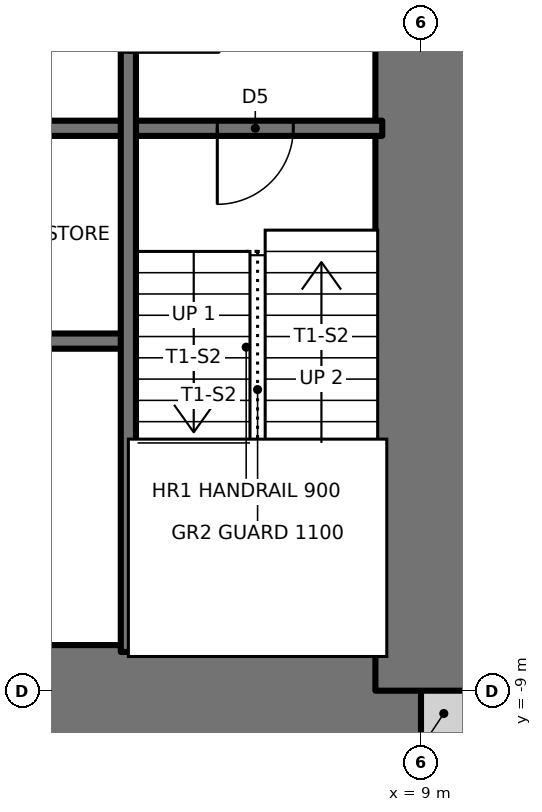
"""IFC4 building model, lengths in metres.
Left out: names, types, materials, properties, quantities, classifications, styles, units other than length and angle.
Written with IfcOpenShell. Run it as: python <this file> out.ifc"""

import sys

from ifc_helpers import new_model, si_unit, direction, frame, frame_2d, origin, place, context, subcontext, project, spatial, rectangle, extrude, element, fill, save


model = new_model("IFC4")
c1 = context("Model", 3, precision=1e-05, world=origin(), true_north=direction((0.0, 1.0)))
c2 = subcontext(c1, "Body", "Model", "MODEL_VIEW")
j1 = project(units=[si_unit("LENGTHUNIT", "METRE"), si_unit("PLANEANGLEUNIT", "RADIAN")], contexts=[c1])
p1 = place(None, origin())
s1 = spatial("IfcSite", under=j1, at=p1, CompositionType="ELEMENT")
p2 = place(p1, origin())
s2 = spatial("IfcBuilding", under=s1, at=p2, CompositionType="ELEMENT")
p3 = place(p2, frame((0.0, 0.0, 253.5)))
s3 = spatial("IfcBuildingStorey", under=s2, at=p3, CompositionType="ELEMENT", Elevation=253.5)
p4 = place(p3, frame((9.0, -9.3, 0.0), z_axis=(0.0, 0.0, 1.0), x_axis=(1.0, 0.0, 0.0)))
e1 = element("IfcWall", 1, at=p4, inside=s3, PredefinedType="SOLIDWALL", context=c2, shape_type="SweptSolid", body=[
    extrude(rectangle(XDim=0.6, YDim=0.6, at=frame_2d((0.3, 0.0))), origin(), (0.0, 0.0, 1.0), 3.5),
])
p5 = place(p3, frame((-9.0, -9.0, 0.0), z_axis=(0.0, 0.0, 1.0), x_axis=(1.0, 0.0, 0.0)))
e2 = element("IfcWall", 2, at=p5, inside=s3, PredefinedType="SHEAR", context=c2, shape_type="SweptSolid", body=[
    extrude(rectangle(XDim=18.0, YDim=1.2, at=frame_2d((9.0, 0.0))), origin(), (0.0, 0.0, 1.0), 3.5),
])
p6 = place(p5, frame((3.775, 0.0, 0.0)))
e3 = element("IfcOpeningElement", 3, at=p6, cuts=e2, PredefinedType="OPENING", context=c2, shape_type="SweptSolid", body=[
    extrude(rectangle(XDim=0.9, YDim=2.1, at=frame_2d((0.45, 1.05))), frame((0.0, 0.61, 0.0), z_axis=(0.0, -1.0, 0.0), x_axis=(1.0, 0.0, 0.0)), (0.0, 0.0, 1.0), 1.22),
])
p7 = place(p5, frame((10.625, 0.0, 0.0)))
e4 = element("IfcOpeningElement", 4, at=p7, cuts=e2, PredefinedType="OPENING", context=c2, shape_type="SweptSolid", body=[
    extrude(rectangle(XDim=0.9, YDim=2.1, at=frame_2d((0.45, 1.05))), frame((0.0, 0.61, 0.0), z_axis=(0.0, -1.0, 0.0), x_axis=(1.0, 0.0, 0.0)), (0.0, 0.0, 1.0), 1.22),
])
p8 = place(p3, frame((9.0, -9.0, 0.0), z_axis=(0.0, 0.0, 1.0), x_axis=(0.0, 1.0, 0.0)))
e5 = element("IfcWall", 5, at=p8, inside=s3, PredefinedType="SHEAR", context=c2, shape_type="SweptSolid", body=[
    extrude(rectangle(XDim=18.0, YDim=1.2, at=frame_2d((9.0, 0.0))), origin(), (0.0, 0.0, 1.0), 3.5),
])
p9 = place(p8, frame((8.5, 0.0, 0.0)))
e6 = element("IfcOpeningElement", 6, at=p9, cuts=e5, PredefinedType="OPENING", context=c2, shape_type="SweptSolid", body=[
    extrude(rectangle(XDim=1.0, YDim=2.1, at=frame_2d((0.5, 1.05))), frame((0.0, 0.61, 0.0), z_axis=(0.0, -1.0, 0.0), x_axis=(1.0, 0.0, 0.0)), (0.0, 0.0, 1.0), 1.22),
])
p10 = place(p3, frame((-8.49, -4.4, 0.0), z_axis=(0.0, 0.0, 1.0), x_axis=(1.0, 0.0, 0.0)))
e7 = element("IfcWall", 7, at=p10, inside=s3, PredefinedType="SOLIDWALL", context=c2, shape_type="SweptSolid", body=[
    extrude(rectangle(XDim=13.64, YDim=0.2, at=frame_2d((6.82, 0.0))), origin(), (0.0, 0.0, 1.0), 3.5),
])
p11 = place(p3, frame((-8.49, -1.6, 0.0), z_axis=(0.0, 0.0, 1.0), x_axis=(1.0, 0.0, 0.0)))
e8 = element("IfcWall", 8, at=p11, inside=s3, PredefinedType="SOLIDWALL", context=c2, shape_type="SweptSolid", body=[
    extrude(rectangle(XDim=16.98, YDim=0.2, at=frame_2d((8.49, 0.0))), origin(), (0.0, 0.0, 1.0), 3.5),
])
p12 = place(p11, frame((14.81, 0.0, 0.0)))
e9 = element("IfcOpeningElement", 9, at=p12, cuts=e8, PredefinedType="OPENING", context=c2, shape_type="SweptSolid", body=[
    extrude(rectangle(XDim=1.0, YDim=2.1, at=frame_2d((0.5, 1.05))), frame((0.0, 0.11, 0.0), z_axis=(0.0, -1.0, 0.0), x_axis=(1.0, 0.0, 0.0)), (0.0, 0.0, 1.0), 0.22),
])
p13 = place(p11, frame((1.232, 0.0, 0.0)))
e10 = element("IfcOpeningElement", 10, at=p13, cuts=e8, PredefinedType="OPENING", context=c2, shape_type="SweptSolid", body=[
    extrude(rectangle(XDim=0.9, YDim=2.1, at=frame_2d((0.45, 1.05))), frame((0.0, 0.11, 0.0), z_axis=(0.0, -1.0, 0.0), x_axis=(1.0, 0.0, 0.0)), (0.0, 0.0, 1.0), 0.22),
])
p14 = place(p11, frame((4.627, 0.0, 0.0)))
e11 = element("IfcOpeningElement", 11, at=p14, cuts=e8, PredefinedType="OPENING", context=c2, shape_type="SweptSolid", body=[
    extrude(rectangle(XDim=0.9, YDim=2.1, at=frame_2d((0.45, 1.05))), frame((0.0, 0.11, 0.0), z_axis=(0.0, -1.0, 0.0), x_axis=(1.0, 0.0, 0.0)), (0.0, 0.0, 1.0), 0.22),
])
p15 = place(p11, frame((8.052, 0.0, 0.0)))
e12 = element("IfcOpeningElement", 12, at=p15, cuts=e8, PredefinedType="OPENING", context=c2, shape_type="SweptSolid", body=[
    extrude(rectangle(XDim=0.9, YDim=2.1, at=frame_2d((0.45, 1.05))), frame((0.0, 0.11, 0.0), z_axis=(0.0, -1.0, 0.0), x_axis=(1.0, 0.0, 0.0)), (0.0, 0.0, 1.0), 0.22),
])
p16 = place(p11, frame((11.478, 0.0, 0.0)))
e13 = element("IfcOpeningElement", 13, at=p16, cuts=e8, PredefinedType="OPENING", context=c2, shape_type="SweptSolid", body=[
    extrude(rectangle(XDim=0.9, YDim=2.1, at=frame_2d((0.45, 1.05))), frame((0.0, 0.11, 0.0), z_axis=(0.0, -1.0, 0.0), x_axis=(1.0, 0.0, 0.0)), (0.0, 0.0, 1.0), 0.22),
])
p17 = place(p3, frame((5.15, -8.49, 0.0), z_axis=(0.0, 0.0, 1.0), x_axis=(0.0, 1.0, 0.0)))
e14 = element("IfcWall", 14, at=p17, inside=s3, PredefinedType="SOLIDWALL", context=c2, shape_type="SweptSolid", body=[
    extrude(rectangle(XDim=13.09, YDim=0.2, at=frame_2d((6.545, 0.0))), origin(), (0.0, 0.0, 1.0), 3.5),
])
p18 = place(p17, frame((7.89, 0.0, 0.0)))
e15 = element("IfcOpeningElement", 15, at=p18, cuts=e14, PredefinedType="OPENING", context=c2, shape_type="SweptSolid", body=[
    extrude(rectangle(XDim=1.2, YDim=2.1, at=frame_2d((0.6, 1.05))), frame((0.0, 0.11, 0.0), z_axis=(0.0, -1.0, 0.0), x_axis=(1.0, 0.0, 0.0)), (0.0, 0.0, 1.0), 0.22),
])
p19 = place(p12, frame((1.0, 0.0, 0.0), z_axis=(0.0, 0.0, 1.0), x_axis=(-1.0, 0.0, 0.0)))
e16 = element("IfcDoor", 16, at=p19, inside=s3, OperationType="SINGLE_SWING_RIGHT", PredefinedType="DOOR", context=c2, shape_type="SweptSolid", body=[
    extrude(rectangle(XDim=1.0, YDim=2.1, at=frame_2d((0.5, 1.05))), frame((0.0, 0.025, 0.0), z_axis=(0.0, -1.0, 0.0), x_axis=(1.0, 0.0, 0.0)), (0.0, 0.0, 1.0), 0.05),
])
fill(e9, e16)
p20 = place(p18, frame((1.2, 0.0, 0.0), z_axis=(0.0, 0.0, 1.0), x_axis=(-1.0, 0.0, 0.0)))
e17 = element("IfcDoor", 17, at=p20, inside=s3, OperationType="SINGLE_SWING_RIGHT", PredefinedType="DOOR", context=c2, shape_type="SweptSolid", body=[
    extrude(rectangle(XDim=1.2, YDim=2.1, at=frame_2d((0.6, 1.05))), frame((0.0, 0.025, 0.0), z_axis=(0.0, -1.0, 0.0), x_axis=(1.0, 0.0, 0.0)), (0.0, 0.0, 1.0), 0.05),
])
fill(e15, e17)
save(model, sys.argv[1])
